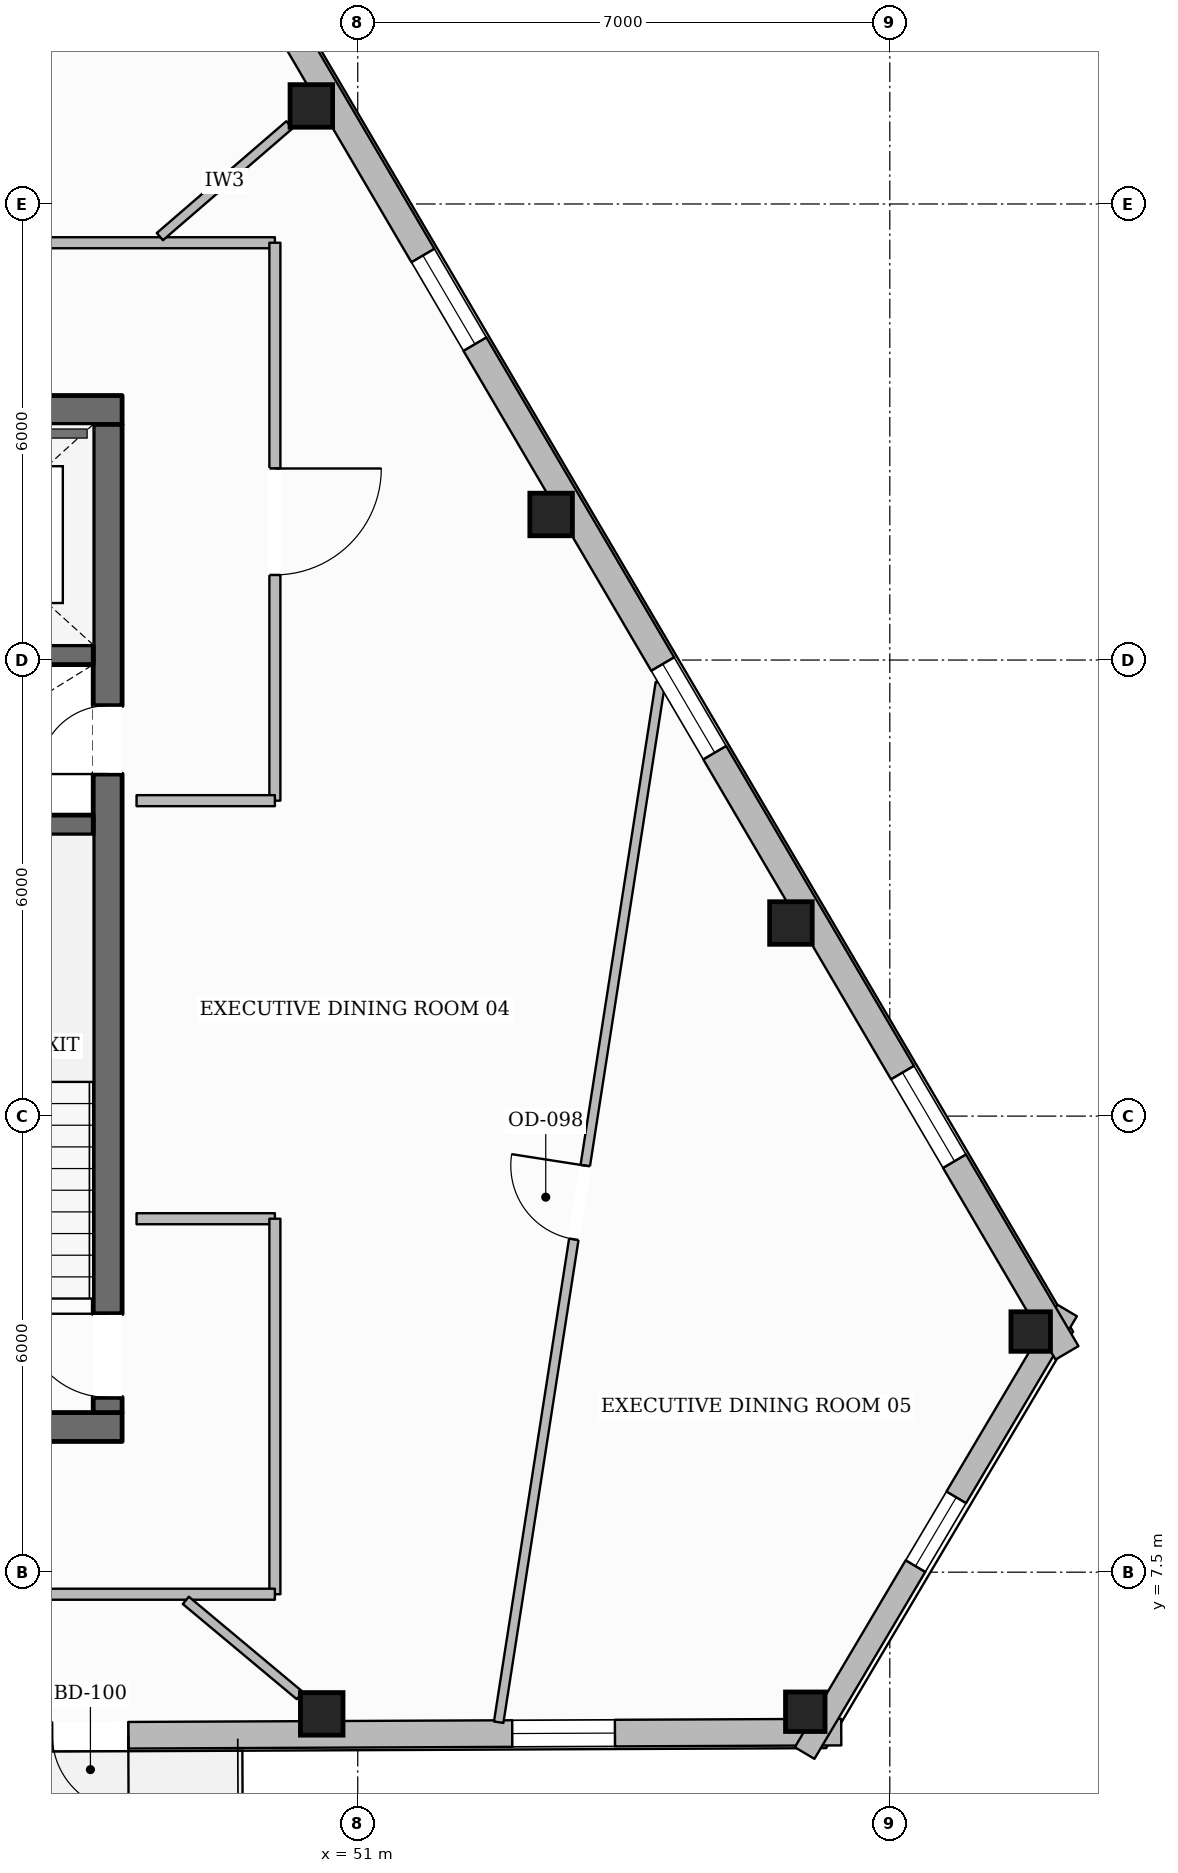
"""IFC4 building model, lengths in metres.
Left out: names, types, materials, properties, quantities, classifications, styles, units other than length and angle.
Written with IfcOpenShell. Run it as: python <this file> out.ifc"""

import sys

from ifc_helpers import new_model, si_unit, direction, frame, frame_2d, origin, origin_2d, place, context, subcontext, project, spatial, rectangle, hollow_rectangle, extrude, element, fill, save


model = new_model("IFC4")
c1 = context("Model", 3, precision=1e-05, world=origin(), true_north=direction((0.0, 1.0)))
c2 = subcontext(c1, "Body", "Model", "MODEL_VIEW")
j1 = project(units=[si_unit("LENGTHUNIT", "METRE"), si_unit("PLANEANGLEUNIT", "RADIAN")], contexts=[c1])
p1 = place(None, origin())
s1 = spatial("IfcSite", under=j1, at=p1, CompositionType="ELEMENT")
p2 = place(p1, origin())
s2 = spatial("IfcBuilding", under=s1, at=p2, CompositionType="ELEMENT")
p3 = place(p2, frame((0.0, 0.0, 278.0)))
s3 = spatial("IfcBuildingStorey", under=s2, at=p3, CompositionType="ELEMENT", Elevation=278.0)
p4 = place(p3, frame((28.1, 9.41, 0.0), z_axis=(0.0, 0.0, 1.0), x_axis=(1.0, 0.0, 0.0)))
e1 = element("IfcWall", 1, at=p4, inside=s3, PredefinedType="SOLIDWALL", context=c2, shape_type="SweptSolid", body=[
    extrude(rectangle(XDim=19.8, YDim=0.38, at=frame_2d((9.9, 0.0))), origin(), (0.0, 0.0, 1.0), 3.61),
])
p5 = place(p4, frame((10.4, 0.0, 0.0)))
e2 = element("IfcOpeningElement", 2, at=p5, cuts=e1, PredefinedType="OPENING", context=c2, shape_type="SweptSolid", body=[
    extrude(rectangle(XDim=1.4, YDim=2.2, at=frame_2d((0.7, 1.1))), frame((0.0, 0.2, 0.0), z_axis=(0.0, -1.0, 0.0), x_axis=(1.0, 0.0, 0.0)), (0.0, 0.0, 1.0), 0.4),
])
p6 = place(p3, frame((28.1, 22.79, 0.0), z_axis=(0.0, 0.0, 1.0), x_axis=(1.0, 0.0, 0.0)))
e3 = element("IfcWall", 3, at=p6, inside=s3, PredefinedType="SOLIDWALL", context=c2, shape_type="SweptSolid", body=[
    extrude(rectangle(XDim=19.8, YDim=0.38, at=frame_2d((9.9, 0.0))), origin(), (0.0, 0.0, 1.0), 3.61),
])
p7 = place(p6, frame((6.175, 0.0, 0.0)))
e4 = element("IfcOpeningElement", 4, at=p7, cuts=e3, PredefinedType="OPENING", context=c2, shape_type="SweptSolid", body=[
    extrude(rectangle(XDim=1.05, YDim=2.15, at=frame_2d((0.525, 1.075))), frame((0.0, 0.2, 0.0), z_axis=(0.0, -1.0, 0.0), x_axis=(1.0, 0.0, 0.0)), (0.0, 0.0, 1.0), 0.4),
])
p8 = place(p6, frame((12.575, 0.0, 0.0)))
e5 = element("IfcOpeningElement", 5, at=p8, cuts=e3, PredefinedType="OPENING", context=c2, shape_type="SweptSolid", body=[
    extrude(rectangle(XDim=1.05, YDim=2.15, at=frame_2d((0.525, 1.075))), frame((0.0, 0.2, 0.0), z_axis=(0.0, -1.0, 0.0), x_axis=(1.0, 0.0, 0.0)), (0.0, 0.0, 1.0), 0.4),
])
p9 = place(p3, frame((47.71, 9.6, 0.0), z_axis=(0.0, 0.0, 1.0), x_axis=(0.0, 1.0, 0.0)))
e6 = element("IfcWall", 6, at=p9, inside=s3, PredefinedType="SOLIDWALL", context=c2, shape_type="SweptSolid", body=[
    extrude(rectangle(XDim=13.0, YDim=0.38, at=frame_2d((6.5, 0.0))), origin(), (0.0, 0.0, 1.0), 3.61),
])
p10 = place(p9, frame((0.2, 0.0, 0.0)))
e7 = element("IfcOpeningElement", 7, at=p10, cuts=e6, PredefinedType="OPENING", context=c2, shape_type="SweptSolid", body=[
    extrude(rectangle(XDim=1.1, YDim=2.15, at=frame_2d((0.55, 1.075))), frame((0.0, 0.2, 0.0), z_axis=(0.0, -1.0, 0.0), x_axis=(1.0, 0.0, 0.0)), (0.0, 0.0, 1.0), 0.4),
])
p11 = place(p9, frame((8.4, 0.0, 0.0)))
e8 = element("IfcOpeningElement", 8, at=p11, cuts=e6, PredefinedType="OPENING", context=c2, shape_type="SweptSolid", body=[
    extrude(rectangle(XDim=0.9, YDim=2.1, at=frame_2d((0.45, 1.05))), frame((0.0, 0.2, 0.0), z_axis=(0.0, -1.0, 0.0), x_axis=(1.0, 0.0, 0.0)), (0.0, 0.0, 1.0), 0.4),
])
for number, where, z_axis, x_axis in (
    (9, (44.32, 17.33, 0.0), (0.0, 0.0, 1.0), (1.0, 0.0, 0.0)),
    (10, (44.32, 19.57, 0.0), (0.0, 0.0, 1.0), (1.0, 0.0, 0.0)),
):
    element("IfcWall", number, at=place(p3, frame(where, z_axis=z_axis, x_axis=x_axis)), inside=s3, PredefinedType="SHEAR", context=c2, shape_type="SweptSolid", body=[
        extrude(rectangle(XDim=3.2, YDim=0.26, at=frame_2d((1.6, 0.0))), origin(), (0.0, 0.0, 1.0), 3.61),
    ])
p12 = place(p3, frame((50.526, 5.636, 0.0), z_axis=(0.0, 0.0, 1.0), x_axis=(1.0, 0.0, 0.0)))
e11 = element("IfcColumn", 11, at=p12, inside=s3, PredefinedType="COLUMN", context=c2, shape_type="SweptSolid", body=[
    extrude(hollow_rectangle(XDim=0.56, YDim=0.56, WallThickness=0.025, at=origin_2d()), origin(), (0.0, 0.0, 1.0), 3.61),
])
for number, where, z_axis, x_axis in (
    (12, (56.888, 5.664, 0.0), (0.0, 0.0, 1.0), (1.0, 0.0, 0.0)),
    (13, (59.854, 10.666, 0.0), (0.0, 0.0, 1.0), (1.0, 0.0, 0.0)),
):
    element("IfcColumn", number, at=place(p3, frame(where, z_axis=z_axis, x_axis=x_axis)), inside=s3, PredefinedType="COLUMN", context=c2, shape_type="SweptSolid", body=[
        extrude(hollow_rectangle(XDim=0.52, YDim=0.52, WallThickness=0.024, at=origin_2d()), origin(), (0.0, 0.0, 1.0), 3.61),
    ])
for number, where, z_axis, x_axis in (
    (14, (56.699, 16.04, 0.0), (0.0, 0.0, 1.0), (1.0, 0.0, 0.0)),
    (15, (53.544, 21.415, 0.0), (0.0, 0.0, 1.0), (1.0, 0.0, 0.0)),
    (16, (50.389, 26.79, 0.0), (0.0, 0.0, 1.0), (1.0, 0.0, 0.0)),
):
    element("IfcColumn", number, at=place(p3, frame(where, z_axis=z_axis, x_axis=x_axis)), inside=s3, PredefinedType="COLUMN", context=c2, shape_type="SweptSolid", body=[
        extrude(hollow_rectangle(XDim=0.56, YDim=0.56, WallThickness=0.025, at=origin_2d()), origin(), (0.0, 0.0, 1.0), 3.61),
    ])
p13 = place(p3, frame((57.361, 5.396, 0.0), z_axis=(0.0, 0.0, 1.0), x_axis=(-0.99999021081, -0.004424735446, 0.0)))
e17 = element("IfcWall", 17, at=p13, inside=s3, PredefinedType="STANDARD", context=c2, shape_type="SweptSolid", body=[
    extrude(rectangle(XDim=39.12, YDim=0.35, at=frame_2d((19.56, 0.0))), origin(), (0.0, 0.0, 1.0), 3.196),
])
p14 = place(p13, frame((9.38, 0.0, 0.0)))
e18 = element("IfcOpeningElement", 18, at=p14, cuts=e17, PredefinedType="OPENING", context=c2, shape_type="SweptSolid", body=[
    extrude(rectangle(XDim=1.0, YDim=2.2, at=frame_2d((0.5, 1.1))), frame((0.0, 0.185, 0.0), z_axis=(0.0, -1.0, 0.0), x_axis=(1.0, 0.0, 0.0)), (0.0, 0.0, 1.0), 0.37),
])
p15 = place(p13, frame((34.788, 0.0, 0.65)))
e19 = element("IfcOpeningElement", 19, at=p15, cuts=e17, PredefinedType="OPENING", context=c2, shape_type="SweptSolid", body=[
    extrude(rectangle(XDim=1.35, YDim=1.75, at=frame_2d((0.675, 0.875))), frame((0.0, 0.185, 0.0), z_axis=(0.0, -1.0, 0.0), x_axis=(1.0, 0.0, 0.0)), (0.0, 0.0, 1.0), 0.37),
])
p16 = place(p13, frame((28.426, 0.0, 0.65)))
e20 = element("IfcOpeningElement", 20, at=p16, cuts=e17, PredefinedType="OPENING", context=c2, shape_type="SweptSolid", body=[
    extrude(rectangle(XDim=1.35, YDim=1.75, at=frame_2d((0.675, 0.875))), frame((0.0, 0.185, 0.0), z_axis=(0.0, -1.0, 0.0), x_axis=(1.0, 0.0, 0.0)), (0.0, 0.0, 1.0), 0.37),
])
p17 = place(p13, frame((22.064, 0.0, 0.65)))
e21 = element("IfcOpeningElement", 21, at=p17, cuts=e17, PredefinedType="OPENING", context=c2, shape_type="SweptSolid", body=[
    extrude(rectangle(XDim=1.35, YDim=1.75, at=frame_2d((0.675, 0.875))), frame((0.0, 0.185, 0.0), z_axis=(0.0, -1.0, 0.0), x_axis=(1.0, 0.0, 0.0)), (0.0, 0.0, 1.0), 0.37),
])
p18 = place(p13, frame((2.978, 0.0, 0.65)))
e22 = element("IfcOpeningElement", 22, at=p18, cuts=e17, PredefinedType="OPENING", context=c2, shape_type="SweptSolid", body=[
    extrude(rectangle(XDim=1.35, YDim=1.75, at=frame_2d((0.675, 0.875))), frame((0.0, 0.185, 0.0), z_axis=(0.0, -1.0, 0.0), x_axis=(1.0, 0.0, 0.0)), (0.0, 0.0, 1.0), 0.37),
])
p19 = place(p3, frame((60.333, 10.944, 0.0), z_axis=(0.0, 0.0, 1.0), x_axis=(-0.510055421905, -0.860141538693, 0.0)))
e23 = element("IfcWall", 23, at=p19, inside=s3, PredefinedType="STANDARD", context=c2, shape_type="SweptSolid", body=[
    extrude(rectangle(XDim=6.77, YDim=0.3, at=frame_2d((3.385, 0.0))), origin(), (0.0, 0.0, 1.0), 3.196),
])
p20 = place(p19, frame((2.86, 0.0, 0.65)))
e24 = element("IfcOpeningElement", 24, at=p20, cuts=e23, PredefinedType="OPENING", context=c2, shape_type="SweptSolid", body=[
    extrude(rectangle(XDim=1.05, YDim=1.7, at=frame_2d((0.525, 0.85))), frame((0.0, 0.16, 0.0), z_axis=(0.0, -1.0, 0.0), x_axis=(1.0, 0.0, 0.0)), (0.0, 0.0, 1.0), 0.32),
])
p21 = place(p3, frame((40.917, 43.461, 0.0), z_axis=(0.0, 0.0, 1.0), x_axis=(0.506204788728, -0.862413306872, 0.0)))
e25 = element("IfcWall", 25, at=p21, inside=s3, PredefinedType="STANDARD", context=c2, shape_type="SweptSolid", body=[
    extrude(rectangle(XDim=38.352, YDim=0.35, at=frame_2d((19.176, 0.0))), origin(), (0.0, 0.0, 1.0), 3.196),
])
p22 = place(p21, frame((9.188, 0.0, 0.0)))
e26 = element("IfcOpeningElement", 26, at=p22, cuts=e25, PredefinedType="OPENING", context=c2, shape_type="SweptSolid", body=[
    extrude(rectangle(XDim=1.0, YDim=2.2, at=frame_2d((0.5, 1.1))), frame((0.0, 0.185, 0.0), z_axis=(0.0, -1.0, 0.0), x_axis=(1.0, 0.0, 0.0)), (0.0, 0.0, 1.0), 0.37),
])
p23 = place(p21, frame((34.078, 0.0, 0.65)))
e27 = element("IfcOpeningElement", 27, at=p23, cuts=e25, PredefinedType="OPENING", context=c2, shape_type="SweptSolid", body=[
    extrude(rectangle(XDim=1.35, YDim=1.75, at=frame_2d((0.675, 0.875))), frame((0.0, 0.185, 0.0), z_axis=(0.0, -1.0, 0.0), x_axis=(1.0, 0.0, 0.0)), (0.0, 0.0, 1.0), 0.37),
])
p24 = place(p21, frame((27.846, 0.0, 0.65)))
e28 = element("IfcOpeningElement", 28, at=p24, cuts=e25, PredefinedType="OPENING", context=c2, shape_type="SweptSolid", body=[
    extrude(rectangle(XDim=1.35, YDim=1.75, at=frame_2d((0.675, 0.875))), frame((0.0, 0.185, 0.0), z_axis=(0.0, -1.0, 0.0), x_axis=(1.0, 0.0, 0.0)), (0.0, 0.0, 1.0), 0.37),
])
p25 = place(p21, frame((21.614, 0.0, 0.65)))
e29 = element("IfcOpeningElement", 29, at=p25, cuts=e25, PredefinedType="OPENING", context=c2, shape_type="SweptSolid", body=[
    extrude(rectangle(XDim=1.35, YDim=1.75, at=frame_2d((0.675, 0.875))), frame((0.0, 0.185, 0.0), z_axis=(0.0, -1.0, 0.0), x_axis=(1.0, 0.0, 0.0)), (0.0, 0.0, 1.0), 0.37),
])
p26 = place(p21, frame((2.917, 0.0, 0.65)))
e30 = element("IfcOpeningElement", 30, at=p26, cuts=e25, PredefinedType="OPENING", context=c2, shape_type="SweptSolid", body=[
    extrude(rectangle(XDim=1.35, YDim=1.75, at=frame_2d((0.675, 0.875))), frame((0.0, 0.185, 0.0), z_axis=(0.0, -1.0, 0.0), x_axis=(1.0, 0.0, 0.0)), (0.0, 0.0, 1.0), 0.37),
])
p27 = place(p3, frame((45.2, 24.99, 0.0), z_axis=(0.0, 0.0, 1.0), x_axis=(1.0, 0.0, 0.0)))
e31 = element("IfcWall", 31, at=p27, inside=s3, PredefinedType="PARTITIONING", context=c2, shape_type="SweptSolid", body=[
    extrude(rectangle(XDim=4.71, YDim=0.145, at=frame_2d((2.355, 0.0))), origin(), (0.0, 0.0, 1.0), 3.61),
])
p28 = place(p3, frame((49.91, 24.99, 0.0), z_axis=(0.0, 0.0, 1.0), x_axis=(0.0, -1.0, 0.0)))
e32 = element("IfcWall", 32, at=p28, inside=s3, PredefinedType="PARTITIONING", context=c2, shape_type="SweptSolid", body=[
    extrude(rectangle(XDim=7.34, YDim=0.145, at=frame_2d((3.67, 0.0))), origin(), (0.0, 0.0, 1.0), 3.349),
])
p29 = place(p28, frame((2.97, 0.0, 0.0)))
e33 = element("IfcOpeningElement", 33, at=p29, cuts=e32, PredefinedType="OPENING", context=c2, shape_type="SweptSolid", body=[
    extrude(rectangle(XDim=1.4, YDim=2.2, at=frame_2d((0.7, 1.1))), frame((0.0, 0.083, 0.0), z_axis=(0.0, -1.0, 0.0), x_axis=(1.0, 0.0, 0.0)), (0.0, 0.0, 1.0), 0.165),
])
for number, where, z_axis, x_axis in (
    (34, (49.91, 17.65, 0.0), (0.0, 0.0, 1.0), (-1.0, 0.0, 0.0)),
    (35, (48.09, 12.15, 0.0), (0.0, 0.0, 1.0), (1.0, 0.0, 0.0)),
):
    element("IfcWall", number, at=place(p3, frame(where, z_axis=z_axis, x_axis=x_axis)), inside=s3, PredefinedType="PARTITIONING", context=c2, shape_type="SweptSolid", body=[
        extrude(rectangle(XDim=1.82, YDim=0.145, at=frame_2d((0.91, 0.0))), origin(), (0.0, 0.0, 1.0), 3.61),
    ])
p30 = place(p3, frame((49.91, 12.15, 0.0), z_axis=(0.0, 0.0, 1.0), x_axis=(0.0, -1.0, 0.0)))
e36 = element("IfcWall", 36, at=p30, inside=s3, PredefinedType="PARTITIONING", context=c2, shape_type="SweptSolid", body=[
    extrude(rectangle(XDim=4.94, YDim=0.145, at=frame_2d((2.47, 0.0))), origin(), (0.0, 0.0, 1.0), 3.61),
])
p31 = place(p3, frame((49.91, 7.21, 0.0), z_axis=(0.0, 0.0, 1.0), x_axis=(-1.0, 0.0, 0.0)))
e37 = element("IfcWall", 37, at=p31, inside=s3, PredefinedType="PARTITIONING", context=c2, shape_type="SweptSolid", body=[
    extrude(rectangle(XDim=23.82, YDim=0.145, at=frame_2d((11.91, 0.0))), origin(), (0.0, 0.0, 1.0), 3.61),
])
p32 = place(p31, frame((11.762, 0.0, 0.0)))
e38 = element("IfcOpeningElement", 38, at=p32, cuts=e37, PredefinedType="OPENING", context=c2, shape_type="SweptSolid", body=[
    extrude(rectangle(XDim=1.4, YDim=2.2, at=frame_2d((0.7, 1.1))), frame((0.0, 0.083, 0.0), z_axis=(0.0, -1.0, 0.0), x_axis=(1.0, 0.0, 0.0)), (0.0, 0.0, 1.0), 0.165),
])
p33 = place(p3, frame((48.397, 25.071, 0.0), z_axis=(0.0, 0.0, 1.0), x_axis=(0.7571861728, 0.653199127158, 0.0)))
e39 = element("IfcWall", 39, at=p33, inside=s3, PredefinedType="PARTITIONING", context=c2, shape_type="SweptSolid", body=[
    extrude(rectangle(XDim=2.251, YDim=0.125, at=frame_2d((1.126, 0.0))), origin(), (0.0, 0.0, 1.0), 3.61),
])
p34 = place(p3, frame((48.738, 7.129, 0.0), z_axis=(0.0, 0.0, 1.0), x_axis=(0.767493686338, -0.641056504086, 0.0)))
e40 = element("IfcWall", 40, at=p34, inside=s3, PredefinedType="PARTITIONING", context=c2, shape_type="SweptSolid", body=[
    extrude(rectangle(XDim=1.954, YDim=0.125, at=frame_2d((0.977, 0.0))), origin(), (0.0, 0.0, 1.0), 3.61),
])
p35 = place(p3, frame((52.854, 5.526, 0.0), z_axis=(0.0, 0.0, 1.0), x_axis=(0.153703179187, 0.988117064273, 0.0)))
e41 = element("IfcWall", 41, at=p35, inside=s3, PredefinedType="PARTITIONING", context=c2, shape_type="SweptSolid", body=[
    extrude(rectangle(XDim=13.841, YDim=0.125, at=frame_2d((6.921, 0.0))), origin(), (0.0, 0.0, 1.0), 3.349),
])
p36 = place(p35, frame((6.431, 0.0, 0.0)))
e42 = element("IfcOpeningElement", 42, at=p36, cuts=e41, PredefinedType="OPENING", context=c2, shape_type="SweptSolid", body=[
    extrude(rectangle(XDim=0.98, YDim=2.15, at=frame_2d((0.49, 1.075))), frame((0.0, 0.073, 0.0), z_axis=(0.0, -1.0, 0.0), x_axis=(1.0, 0.0, 0.0)), (0.0, 0.0, 1.0), 0.145),
])
p37 = place(p14, origin())
e43 = element("IfcDoor", 43, at=p37, inside=s3, OperationType="SINGLE_SWING_LEFT", PredefinedType="DOOR", context=c2, shape_type="SweptSolid", body=[
    extrude(rectangle(XDim=1.0, YDim=2.2, at=frame_2d((0.5, 1.1))), frame((0.0, 0.025, 0.0), z_axis=(0.0, -1.0, 0.0), x_axis=(1.0, 0.0, 0.0)), (0.0, 0.0, 1.0), 0.05),
])
fill(e18, e43)
p38 = place(p18, origin())
e44 = element("IfcWindow", 44, at=p38, inside=s3, PartitioningType="SINGLE_PANEL", PredefinedType="WINDOW", context=c2, shape_type="SweptSolid", body=[
    extrude(rectangle(XDim=1.35, YDim=1.75, at=frame_2d((0.675, 0.875))), frame((0.0, 0.03, 0.0), z_axis=(0.0, -1.0, 0.0), x_axis=(1.0, 0.0, 0.0)), (0.0, 0.0, 1.0), 0.06),
])
fill(e22, e44)
p39 = place(p23, origin())
e45 = element("IfcWindow", 45, at=p39, inside=s3, PartitioningType="SINGLE_PANEL", PredefinedType="WINDOW", context=c2, shape_type="SweptSolid", body=[
    extrude(rectangle(XDim=1.35, YDim=1.75, at=frame_2d((0.675, 0.875))), frame((0.0, 0.03, 0.0), z_axis=(0.0, -1.0, 0.0), x_axis=(1.0, 0.0, 0.0)), (0.0, 0.0, 1.0), 0.06),
])
fill(e27, e45)
p40 = place(p24, origin())
e46 = element("IfcWindow", 46, at=p40, inside=s3, PartitioningType="SINGLE_PANEL", PredefinedType="WINDOW", context=c2, shape_type="SweptSolid", body=[
    extrude(rectangle(XDim=1.35, YDim=1.75, at=frame_2d((0.675, 0.875))), frame((0.0, 0.03, 0.0), z_axis=(0.0, -1.0, 0.0), x_axis=(1.0, 0.0, 0.0)), (0.0, 0.0, 1.0), 0.06),
])
fill(e28, e46)
p41 = place(p25, origin())
e47 = element("IfcWindow", 47, at=p41, inside=s3, PartitioningType="SINGLE_PANEL", PredefinedType="WINDOW", context=c2, shape_type="SweptSolid", body=[
    extrude(rectangle(XDim=1.35, YDim=1.75, at=frame_2d((0.675, 0.875))), frame((0.0, 0.03, 0.0), z_axis=(0.0, -1.0, 0.0), x_axis=(1.0, 0.0, 0.0)), (0.0, 0.0, 1.0), 0.06),
])
fill(e29, e47)
p42 = place(p20, origin())
e48 = element("IfcWindow", 48, at=p42, inside=s3, PartitioningType="SINGLE_PANEL", PredefinedType="WINDOW", context=c2, shape_type="SweptSolid", body=[
    extrude(rectangle(XDim=1.05, YDim=1.7, at=frame_2d((0.525, 0.85))), frame((0.0, 0.03, 0.0), z_axis=(0.0, -1.0, 0.0), x_axis=(1.0, 0.0, 0.0)), (0.0, 0.0, 1.0), 0.06),
])
fill(e24, e48)
p43 = place(p10, origin())
e49 = element("IfcDoor", 49, at=p43, inside=s3, OperationType="SINGLE_SWING_RIGHT", PredefinedType="DOOR", context=c2, shape_type="SweptSolid", body=[
    extrude(rectangle(XDim=1.1, YDim=2.15, at=frame_2d((0.55, 1.075))), frame((0.0, 0.025, 0.0), z_axis=(0.0, -1.0, 0.0), x_axis=(1.0, 0.0, 0.0)), (0.0, 0.0, 1.0), 0.05),
])
fill(e7, e49)
p44 = place(p11, origin())
e50 = element("IfcDoor", 50, at=p44, inside=s3, OperationType="SINGLE_SWING_LEFT", PredefinedType="DOOR", context=c2, shape_type="SweptSolid", body=[
    extrude(rectangle(XDim=0.9, YDim=2.1, at=frame_2d((0.45, 1.05))), frame((0.0, 0.025, 0.0), z_axis=(0.0, -1.0, 0.0), x_axis=(1.0, 0.0, 0.0)), (0.0, 0.0, 1.0), 0.05),
])
fill(e8, e50)
p45 = place(p29, origin())
e51 = element("IfcDoor", 51, at=p45, inside=s3, OperationType="SINGLE_SWING_LEFT", PredefinedType="DOOR", context=c2, shape_type="SweptSolid", body=[
    extrude(rectangle(XDim=1.4, YDim=2.2, at=frame_2d((0.7, 1.1))), frame((0.0, 0.025, 0.0), z_axis=(0.0, -1.0, 0.0), x_axis=(1.0, 0.0, 0.0)), (0.0, 0.0, 1.0), 0.05),
])
fill(e33, e51)
p46 = place(p36, origin())
e52 = element("IfcDoor", 52, at=p46, inside=s3, OperationType="SINGLE_SWING_RIGHT", PredefinedType="DOOR", context=c2, shape_type="SweptSolid", body=[
    extrude(rectangle(XDim=0.98, YDim=2.15, at=frame_2d((0.49, 1.075))), frame((0.0, 0.025, 0.0), z_axis=(0.0, -1.0, 0.0), x_axis=(1.0, 0.0, 0.0)), (0.0, 0.0, 1.0), 0.05),
])
fill(e42, e52)
save(model, sys.argv[1])
